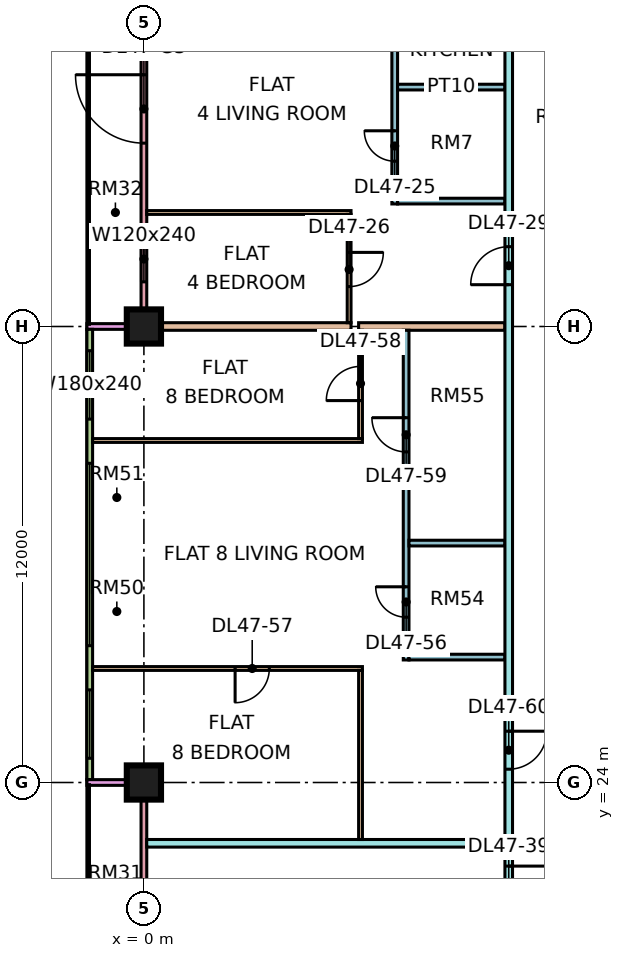
"""IFC4 building model, lengths in metres.
Left out: names, types, materials, properties, quantities, classifications, styles, units other than length and angle.
Written with IfcOpenShell. Run it as: python <this file> out.ifc"""

import sys

from ifc_helpers import new_model, si_unit, direction, frame, frame_2d, origin, origin_2d, place, context, subcontext, project, spatial, rectangle, extrude, element, fill, save


model = new_model("IFC4")
c1 = context("Model", 3, precision=1e-05, world=origin(), true_north=direction((0.0, 1.0)))
c2 = subcontext(c1, "Body", "Model", "MODEL_VIEW")
j1 = project(units=[si_unit("LENGTHUNIT", "METRE"), si_unit("PLANEANGLEUNIT", "RADIAN")], contexts=[c1])
p1 = place(None, origin())
s1 = spatial("IfcSite", under=j1, at=p1, CompositionType="ELEMENT")
p2 = place(p1, origin())
s2 = spatial("IfcBuilding", under=s1, at=p2, CompositionType="ELEMENT")
p3 = place(p2, frame((0.0, 0.0, 202.4)))
s3 = spatial("IfcBuildingStorey", under=s2, at=p3, CompositionType="ELEMENT", Elevation=202.4)
p4 = place(p3, frame((0.0, 24.0, 0.0), z_axis=(0.0, 0.0, 1.0), x_axis=(1.0, 0.0, 0.0)))
e1 = element("IfcColumn", 1, at=p4, inside=s3, PredefinedType="COLUMN", context=c2, shape_type="SweptSolid", body=[
    extrude(rectangle(XDim=0.9, YDim=0.9, at=origin_2d()), origin(), (0.0, 0.0, 1.0), 3.75),
])
p5 = place(p3, frame((0.0, 36.0, 0.0), z_axis=(0.0, 0.0, 1.0), x_axis=(1.0, 0.0, 0.0)))
e2 = element("IfcColumn", 2, at=p5, inside=s3, PredefinedType="COLUMN", context=c2, shape_type="SweptSolid", body=[
    extrude(rectangle(XDim=0.9, YDim=0.9, at=origin_2d()), origin(), (0.0, 0.0, 1.0), 3.75),
])
p6 = place(p3, frame((0.0, 47.925, 0.0), z_axis=(0.0, 0.0, 1.0), x_axis=(0.0, -1.0, 0.0)))
e3 = element("IfcWall", 3, at=p6, inside=s3, PredefinedType="SOLIDWALL", context=c2, shape_type="SweptSolid", body=[
    extrude(rectangle(XDim=11.85, YDim=0.15, at=frame_2d((5.925, 0.0))), origin(), (0.0, 0.0, 1.0), 3.3),
])
p7 = place(p6, frame((0.587, 0.0, 0.45)))
e4 = element("IfcOpeningElement", 4, at=p7, cuts=e3, PredefinedType="OPENING", context=c2, shape_type="SweptSolid", body=[
    extrude(rectangle(XDim=1.2, YDim=2.4, at=frame_2d((0.6, 1.2))), frame((0.0, 0.085, 0.0), z_axis=(0.0, -1.0, 0.0), x_axis=(1.0, 0.0, 0.0)), (0.0, 0.0, 1.0), 0.17),
])
p8 = place(p6, frame((5.3, 0.0, 0.0)))
e5 = element("IfcOpeningElement", 5, at=p8, cuts=e3, PredefinedType="OPENING", context=c2, shape_type="SweptSolid", body=[
    extrude(rectangle(XDim=1.8, YDim=2.4, at=frame_2d((0.9, 1.2))), frame((0.0, 0.085, 0.0), z_axis=(0.0, -1.0, 0.0), x_axis=(1.0, 0.0, 0.0)), (0.0, 0.0, 1.0), 0.17),
])
p9 = place(p6, frame((9.55, 0.0, 0.45)))
e6 = element("IfcOpeningElement", 6, at=p9, cuts=e3, PredefinedType="OPENING", context=c2, shape_type="SweptSolid", body=[
    extrude(rectangle(XDim=1.2, YDim=2.4, at=frame_2d((0.6, 1.2))), frame((0.0, 0.085, 0.0), z_axis=(0.0, -1.0, 0.0), x_axis=(1.0, 0.0, 0.0)), (0.0, 0.0, 1.0), 0.17),
])
p10 = place(p3, frame((-1.5, 36.0, 0.0), z_axis=(0.0, 0.0, 1.0), x_axis=(1.0, 0.0, 0.0)))
e7 = element("IfcWall", 7, at=p10, inside=s3, PredefinedType="SOLIDWALL", context=c2, shape_type="SweptSolid", body=[
    extrude(rectangle(XDim=1.5, YDim=0.15, at=frame_2d((0.75, 0.0))), origin(), (0.0, 0.0, 1.0), 3.3),
])
p11 = place(p3, frame((-1.425, 35.925, 0.0), z_axis=(0.0, 0.0, 1.0), x_axis=(0.0, -1.0, 0.0)))
e8 = element("IfcWall", 8, at=p11, inside=s3, PredefinedType="SOLIDWALL", context=c2, shape_type="SweptSolid", body=[
    extrude(rectangle(XDim=11.85, YDim=0.15, at=frame_2d((5.925, 0.0))), origin(), (0.0, 0.0, 1.0), 3.3),
])
p12 = place(p11, frame((0.562, 0.0, 0.45)))
e9 = element("IfcOpeningElement", 9, at=p12, cuts=e8, PredefinedType="OPENING", context=c2, shape_type="SweptSolid", body=[
    extrude(rectangle(XDim=1.8, YDim=2.4, at=frame_2d((0.9, 1.2))), frame((0.0, 0.085, 0.0), z_axis=(0.0, -1.0, 0.0), x_axis=(1.0, 0.0, 0.0)), (0.0, 0.0, 1.0), 0.17),
])
p13 = place(p11, frame((3.525, 0.0, 0.45)))
e10 = element("IfcOpeningElement", 10, at=p13, cuts=e8, PredefinedType="OPENING", context=c2, shape_type="SweptSolid", body=[
    extrude(rectangle(XDim=4.8, YDim=2.4, at=frame_2d((2.4, 1.2))), frame((0.0, 0.085, 0.0), z_axis=(0.0, -1.0, 0.0), x_axis=(1.0, 0.0, 0.0)), (0.0, 0.0, 1.0), 0.17),
])
p14 = place(p11, frame((9.488, 0.0, 0.45)))
e11 = element("IfcOpeningElement", 11, at=p14, cuts=e8, PredefinedType="OPENING", context=c2, shape_type="SweptSolid", body=[
    extrude(rectangle(XDim=1.8, YDim=2.4, at=frame_2d((0.9, 1.2))), frame((0.0, 0.085, 0.0), z_axis=(0.0, -1.0, 0.0), x_axis=(1.0, 0.0, 0.0)), (0.0, 0.0, 1.0), 0.17),
])
p15 = place(p3, frame((0.0, 23.925, 0.0), z_axis=(0.0, 0.0, 1.0), x_axis=(0.0, -1.0, 0.0)))
e12 = element("IfcWall", 12, at=p15, inside=s3, PredefinedType="SOLIDWALL", context=c2, shape_type="SweptSolid", body=[
    extrude(rectangle(XDim=11.35, YDim=0.15, at=frame_2d((5.675, 0.0))), origin(), (0.0, 0.0, 1.0), 3.3),
])
p16 = place(p15, frame((6.738, 0.0, 0.0)))
e13 = element("IfcOpeningElement", 13, at=p16, cuts=e12, PredefinedType="OPENING", context=c2, shape_type="SweptSolid", body=[
    extrude(rectangle(XDim=1.8, YDim=2.4, at=frame_2d((0.9, 1.2))), frame((0.0, 0.085, 0.0), z_axis=(0.0, -1.0, 0.0), x_axis=(1.0, 0.0, 0.0)), (0.0, 0.0, 1.0), 0.17),
])
p17 = place(p3, frame((-1.5, 24.0, 0.0), z_axis=(0.0, 0.0, 1.0), x_axis=(1.0, 0.0, 0.0)))
e14 = element("IfcWall", 14, at=p17, inside=s3, PredefinedType="SOLIDWALL", context=c2, shape_type="SweptSolid", body=[
    extrude(rectangle(XDim=1.5, YDim=0.15, at=frame_2d((0.75, 0.0))), origin(), (0.0, 0.0, 1.0), 3.3),
])
p18 = place(p3, frame((-1.35, 27.0, 0.0), z_axis=(0.0, 0.0, 1.0), x_axis=(1.0, 0.0, 0.0)))
e15 = element("IfcWall", 15, at=p18, inside=s3, PredefinedType="PARTITIONING", context=c2, shape_type="SweptSolid", body=[
    extrude(rectangle(XDim=7.1, YDim=0.1, at=frame_2d((3.55, 0.0))), origin(), (0.0, 0.0, 1.0), 3.3),
])
p19 = place(p18, frame((3.75, 0.0, 0.0)))
e16 = element("IfcOpeningElement", 16, at=p19, cuts=e15, PredefinedType="OPENING", context=c2, shape_type="SweptSolid", body=[
    extrude(rectangle(XDim=0.9, YDim=2.1, at=frame_2d((0.45, 1.05))), frame((0.0, 0.06, 0.0), z_axis=(0.0, -1.0, 0.0), x_axis=(1.0, 0.0, 0.0)), (0.0, 0.0, 1.0), 0.12),
])
p20 = place(p3, frame((-1.35, 33.0, 0.0), z_axis=(0.0, 0.0, 1.0), x_axis=(1.0, 0.0, 0.0)))
e17 = element("IfcWall", 17, at=p20, inside=s3, PredefinedType="PARTITIONING", context=c2, shape_type="SweptSolid", body=[
    extrude(rectangle(XDim=7.1, YDim=0.1, at=frame_2d((3.55, 0.0))), origin(), (0.0, 0.0, 1.0), 3.3),
])
e18 = element("IfcWall", 18, at=p5, inside=s3, PredefinedType="PARTITIONING", context=c2, shape_type="SweptSolid", body=[
    extrude(rectangle(XDim=5.45, YDim=0.2, at=frame_2d((2.725, 0.0))), origin(), (0.0, 0.0, 1.0), 3.3),
])
p21 = place(p3, frame((0.074, 22.4, 0.0), z_axis=(0.0, 0.0, 1.0), x_axis=(1.0, 0.0, 0.0)))
e19 = element("IfcWall", 19, at=p21, inside=s3, PredefinedType="PARTITIONING", context=c2, shape_type="SweptSolid", body=[
    extrude(rectangle(XDim=9.426, YDim=0.2, at=frame_2d((4.713, 0.0))), origin(), (0.0, 0.0, 1.0), 3.3),
])
p22 = place(p3, frame((0.074, 39.0, 0.0), z_axis=(0.0, 0.0, 1.0), x_axis=(1.0, 0.0, 0.0)))
e20 = element("IfcWall", 20, at=p22, inside=s3, PredefinedType="PARTITIONING", context=c2, shape_type="SweptSolid", body=[
    extrude(rectangle(XDim=5.376, YDim=0.1, at=frame_2d((2.688, 0.0))), origin(), (0.0, 0.0, 1.0), 3.3),
])
p23 = place(p3, frame((5.4, 36.1, 0.0), z_axis=(0.0, 0.0, 1.0), x_axis=(0.0, 1.0, 0.0)))
e21 = element("IfcWall", 21, at=p23, inside=s3, PredefinedType="PARTITIONING", context=c2, shape_type="SweptSolid", body=[
    extrude(rectangle(XDim=2.85, YDim=0.1, at=frame_2d((1.425, 0.0))), origin(), (0.0, 0.0, 1.0), 3.3),
])
p24 = place(p23, frame((0.95, 0.0, 0.0)))
e22 = element("IfcOpeningElement", 22, at=p24, cuts=e21, PredefinedType="OPENING", context=c2, shape_type="SweptSolid", body=[
    extrude(rectangle(XDim=0.9, YDim=2.1, at=frame_2d((0.45, 1.05))), frame((0.0, 0.06, 0.0), z_axis=(0.0, -1.0, 0.0), x_axis=(1.0, 0.0, 0.0)), (0.0, 0.0, 1.0), 0.12),
])
p25 = place(p3, frame((5.65, 36.0, 0.0), z_axis=(0.0, 0.0, 1.0), x_axis=(1.0, 0.0, 0.0)))
e23 = element("IfcWall", 23, at=p25, inside=s3, PredefinedType="PARTITIONING", context=c2, shape_type="SweptSolid", body=[
    extrude(rectangle(XDim=3.85, YDim=0.2, at=frame_2d((1.925, 0.0))), origin(), (0.0, 0.0, 1.0), 3.3),
])
p26 = place(p3, frame((5.7, 22.5, 0.0), z_axis=(0.0, 0.0, 1.0), x_axis=(0.0, 1.0, 0.0)))
e24 = element("IfcWall", 24, at=p26, inside=s3, PredefinedType="PARTITIONING", context=c2, shape_type="SweptSolid", body=[
    extrude(rectangle(XDim=4.45, YDim=0.1, at=frame_2d((2.225, 0.0))), origin(), (0.0, 0.0, 1.0), 3.3),
])
p27 = place(p3, frame((5.7, 33.05, 0.0), z_axis=(0.0, 0.0, 1.0), x_axis=(0.0, 1.0, 0.0)))
e25 = element("IfcWall", 25, at=p27, inside=s3, PredefinedType="PARTITIONING", context=c2, shape_type="SweptSolid", body=[
    extrude(rectangle(XDim=2.85, YDim=0.1, at=frame_2d((1.425, 0.0))), origin(), (0.0, 0.0, 1.0), 3.3),
])
p28 = place(p27, frame((1.0, 0.0, 0.0)))
e26 = element("IfcOpeningElement", 26, at=p28, cuts=e25, PredefinedType="OPENING", context=c2, shape_type="SweptSolid", body=[
    extrude(rectangle(XDim=0.9, YDim=2.1, at=frame_2d((0.45, 1.05))), frame((0.0, 0.06, 0.0), z_axis=(0.0, -1.0, 0.0), x_axis=(1.0, 0.0, 0.0)), (0.0, 0.0, 1.0), 0.12),
])
p29 = place(p3, frame((6.6, 39.225, 0.0), z_axis=(0.0, 0.0, 1.0), x_axis=(0.0, 1.0, 0.0)))
e27 = element("IfcWall", 27, at=p29, inside=s3, PredefinedType="PARTITIONING", context=c2, shape_type="SweptSolid", body=[
    extrude(rectangle(XDim=8.675, YDim=0.15, at=frame_2d((4.337, 0.0))), origin(), (0.0, 0.0, 1.0), 3.3),
])
p30 = place(p29, frame((1.125, 0.0, 0.0)))
e28 = element("IfcOpeningElement", 28, at=p30, cuts=e27, PredefinedType="OPENING", context=c2, shape_type="SweptSolid", body=[
    extrude(rectangle(XDim=0.8, YDim=2.1, at=frame_2d((0.4, 1.05))), frame((0.0, 0.085, 0.0), z_axis=(0.0, -1.0, 0.0), x_axis=(1.0, 0.0, 0.0)), (0.0, 0.0, 1.0), 0.17),
])
p31 = place(p29, frame((5.475, 0.0, 0.0)))
e29 = element("IfcOpeningElement", 29, at=p31, cuts=e27, PredefinedType="OPENING", context=c2, shape_type="SweptSolid", body=[
    extrude(rectangle(XDim=0.9, YDim=2.1, at=frame_2d((0.45, 1.05))), frame((0.0, 0.085, 0.0), z_axis=(0.0, -1.0, 0.0), x_axis=(1.0, 0.0, 0.0)), (0.0, 0.0, 1.0), 0.17),
])
for number, where, z_axis, x_axis in (
    (30, (6.675, 39.3, 0.0), (0.0, 0.0, 1.0), (1.0, 0.0, 0.0)),
    (31, (6.675, 42.3, 0.0), (0.0, 0.0, 1.0), (1.0, 0.0, 0.0)),
):
    element("IfcWall", number, at=place(p3, frame(where, z_axis=z_axis, x_axis=x_axis)), inside=s3, PredefinedType="PARTITIONING", context=c2, shape_type="SweptSolid", body=[
        extrude(rectangle(XDim=2.825, YDim=0.15, at=frame_2d((1.413, 0.0))), origin(), (0.0, 0.0, 1.0), 3.3),
    ])
p32 = place(p3, frame((6.9, 27.225, 0.0), z_axis=(0.0, 0.0, 1.0), x_axis=(0.0, 1.0, 0.0)))
e32 = element("IfcWall", 32, at=p32, inside=s3, PredefinedType="PARTITIONING", context=c2, shape_type="SweptSolid", body=[
    extrude(rectangle(XDim=8.675, YDim=0.15, at=frame_2d((4.337, 0.0))), origin(), (0.0, 0.0, 1.0), 3.3),
])
p33 = place(p32, frame((1.125, 0.0, 0.0)))
e33 = element("IfcOpeningElement", 33, at=p33, cuts=e32, PredefinedType="OPENING", context=c2, shape_type="SweptSolid", body=[
    extrude(rectangle(XDim=0.8, YDim=2.1, at=frame_2d((0.4, 1.05))), frame((0.0, 0.085, 0.0), z_axis=(0.0, -1.0, 0.0), x_axis=(1.0, 0.0, 0.0)), (0.0, 0.0, 1.0), 0.17),
])
p34 = place(p32, frame((5.475, 0.0, 0.0)))
e34 = element("IfcOpeningElement", 34, at=p34, cuts=e32, PredefinedType="OPENING", context=c2, shape_type="SweptSolid", body=[
    extrude(rectangle(XDim=0.9, YDim=2.1, at=frame_2d((0.45, 1.05))), frame((0.0, 0.085, 0.0), z_axis=(0.0, -1.0, 0.0), x_axis=(1.0, 0.0, 0.0)), (0.0, 0.0, 1.0), 0.17),
])
for number, where, z_axis, x_axis in (
    (35, (6.975, 27.3, 0.0), (0.0, 0.0, 1.0), (1.0, 0.0, 0.0)),
    (36, (6.975, 30.3, 0.0), (0.0, 0.0, 1.0), (1.0, 0.0, 0.0)),
):
    element("IfcWall", number, at=place(p3, frame(where, z_axis=z_axis, x_axis=x_axis)), inside=s3, PredefinedType="PARTITIONING", context=c2, shape_type="SweptSolid", body=[
        extrude(rectangle(XDim=2.525, YDim=0.15, at=frame_2d((1.262, 0.0))), origin(), (0.0, 0.0, 1.0), 3.3),
    ])
p35 = place(p3, frame((9.6, 20.0, 0.0), z_axis=(0.0, 0.0, 1.0), x_axis=(0.0, 1.0, 0.0)))
e37 = element("IfcWall", 37, at=p35, inside=s3, PredefinedType="PARTITIONING", context=c2, shape_type="SweptSolid", body=[
    extrude(rectangle(XDim=44.35, YDim=0.2, at=frame_2d((22.175, 0.0))), origin(), (0.0, 0.0, 1.0), 3.3),
])
p36 = place(p35, frame((17.1, 0.0, 0.0)))
e38 = element("IfcOpeningElement", 38, at=p36, cuts=e37, PredefinedType="OPENING", context=c2, shape_type="SweptSolid", body=[
    extrude(rectangle(XDim=1.0, YDim=2.1, at=frame_2d((0.5, 1.05))), frame((0.0, 0.11, 0.0), z_axis=(0.0, -1.0, 0.0), x_axis=(1.0, 0.0, 0.0)), (0.0, 0.0, 1.0), 0.22),
])
p37 = place(p35, frame((29.1, 0.0, 0.0)))
e39 = element("IfcOpeningElement", 39, at=p37, cuts=e37, PredefinedType="OPENING", context=c2, shape_type="SweptSolid", body=[
    extrude(rectangle(XDim=1.0, YDim=2.1, at=frame_2d((0.5, 1.05))), frame((0.0, 0.11, 0.0), z_axis=(0.0, -1.0, 0.0), x_axis=(1.0, 0.0, 0.0)), (0.0, 0.0, 1.0), 0.22),
])
p38 = place(p35, frame((0.6, 0.0, 0.0)))
e40 = element("IfcOpeningElement", 40, at=p38, cuts=e37, PredefinedType="OPENING", context=c2, shape_type="SweptSolid", body=[
    extrude(rectangle(XDim=1.2, YDim=2.1, at=frame_2d((0.6, 1.05))), frame((0.0, 0.11, 0.0), z_axis=(0.0, -1.0, 0.0), x_axis=(1.0, 0.0, 0.0)), (0.0, 0.0, 1.0), 0.22),
])
p39 = place(p35, frame((4.35, 0.0, 0.0)))
e41 = element("IfcOpeningElement", 41, at=p39, cuts=e37, PredefinedType="OPENING", context=c2, shape_type="SweptSolid", body=[
    extrude(rectangle(XDim=1.0, YDim=2.1, at=frame_2d((0.5, 1.05))), frame((0.0, 0.11, 0.0), z_axis=(0.0, -1.0, 0.0), x_axis=(1.0, 0.0, 0.0)), (0.0, 0.0, 1.0), 0.22),
])
p40 = place(p8, frame((1.8, 0.0, 0.0), z_axis=(0.0, 0.0, 1.0), x_axis=(-1.0, 0.0, 0.0)))
e42 = element("IfcDoor", 42, at=p40, inside=s3, OperationType="DOUBLE_DOOR_SINGLE_SWING", PredefinedType="DOOR", context=c2, shape_type="SweptSolid", body=[
    extrude(rectangle(XDim=1.8, YDim=2.4, at=frame_2d((0.9, 1.2))), frame((0.0, 0.025, 0.0), z_axis=(0.0, -1.0, 0.0), x_axis=(1.0, 0.0, 0.0)), (0.0, 0.0, 1.0), 0.05),
])
fill(e5, e42)
p41 = place(p9, origin())
e43 = element("IfcWindow", 43, at=p41, inside=s3, PartitioningType="SINGLE_PANEL", PredefinedType="WINDOW", context=c2, shape_type="SweptSolid", body=[
    extrude(rectangle(XDim=1.2, YDim=2.4, at=frame_2d((0.6, 1.2))), frame((0.0, 0.03, 0.0), z_axis=(0.0, -1.0, 0.0), x_axis=(1.0, 0.0, 0.0)), (0.0, 0.0, 1.0), 0.06),
])
fill(e6, e43)
p42 = place(p12, origin())
e44 = element("IfcWindow", 44, at=p42, inside=s3, PartitioningType="SINGLE_PANEL", PredefinedType="WINDOW", context=c2, shape_type="SweptSolid", body=[
    extrude(rectangle(XDim=1.8, YDim=2.4, at=frame_2d((0.9, 1.2))), frame((0.0, 0.03, 0.0), z_axis=(0.0, -1.0, 0.0), x_axis=(1.0, 0.0, 0.0)), (0.0, 0.0, 1.0), 0.06),
])
fill(e9, e44)
p43 = place(p13, origin())
e45 = element("IfcWindow", 45, at=p43, inside=s3, PartitioningType="SINGLE_PANEL", PredefinedType="WINDOW", context=c2, shape_type="SweptSolid", body=[
    extrude(rectangle(XDim=4.8, YDim=2.4, at=frame_2d((2.4, 1.2))), frame((0.0, 0.03, 0.0), z_axis=(0.0, -1.0, 0.0), x_axis=(1.0, 0.0, 0.0)), (0.0, 0.0, 1.0), 0.06),
])
fill(e10, e45)
p44 = place(p14, origin())
e46 = element("IfcWindow", 46, at=p44, inside=s3, PartitioningType="SINGLE_PANEL", PredefinedType="WINDOW", context=c2, shape_type="SweptSolid", body=[
    extrude(rectangle(XDim=1.8, YDim=2.4, at=frame_2d((0.9, 1.2))), frame((0.0, 0.03, 0.0), z_axis=(0.0, -1.0, 0.0), x_axis=(1.0, 0.0, 0.0)), (0.0, 0.0, 1.0), 0.06),
])
fill(e11, e46)
p45 = place(p30, frame((0.8, 0.0, 0.0), z_axis=(0.0, 0.0, 1.0), x_axis=(-1.0, 0.0, 0.0)))
e47 = element("IfcDoor", 47, at=p45, inside=s3, OperationType="SINGLE_SWING_RIGHT", PredefinedType="DOOR", context=c2, shape_type="SweptSolid", body=[
    extrude(rectangle(XDim=0.8, YDim=2.1, at=frame_2d((0.4, 1.05))), frame((0.0, 0.025, 0.0), z_axis=(0.0, -1.0, 0.0), x_axis=(1.0, 0.0, 0.0)), (0.0, 0.0, 1.0), 0.05),
])
fill(e28, e47)
p46 = place(p24, origin())
e48 = element("IfcDoor", 48, at=p46, inside=s3, OperationType="SINGLE_SWING_RIGHT", PredefinedType="DOOR", context=c2, shape_type="SweptSolid", body=[
    extrude(rectangle(XDim=0.9, YDim=2.1, at=frame_2d((0.45, 1.05))), frame((0.0, 0.025, 0.0), z_axis=(0.0, -1.0, 0.0), x_axis=(1.0, 0.0, 0.0)), (0.0, 0.0, 1.0), 0.05),
])
fill(e22, e48)
p47 = place(p36, origin())
e49 = element("IfcDoor", 49, at=p47, inside=s3, OperationType="SINGLE_SWING_LEFT", PredefinedType="DOOR", context=c2, shape_type="SweptSolid", body=[
    extrude(rectangle(XDim=1.0, YDim=2.1, at=frame_2d((0.5, 1.05))), frame((0.0, 0.025, 0.0), z_axis=(0.0, -1.0, 0.0), x_axis=(1.0, 0.0, 0.0)), (0.0, 0.0, 1.0), 0.05),
])
fill(e38, e49)
p48 = place(p38, origin())
e50 = element("IfcDoor", 50, at=p48, inside=s3, OperationType="SINGLE_SWING_RIGHT", PredefinedType="DOOR", context=c2, shape_type="SweptSolid", body=[
    extrude(rectangle(XDim=1.2, YDim=2.1, at=frame_2d((0.6, 1.05))), frame((0.0, 0.025, 0.0), z_axis=(0.0, -1.0, 0.0), x_axis=(1.0, 0.0, 0.0)), (0.0, 0.0, 1.0), 0.05),
])
fill(e40, e50)
p49 = place(p33, frame((0.8, 0.0, 0.0), z_axis=(0.0, 0.0, 1.0), x_axis=(-1.0, 0.0, 0.0)))
e51 = element("IfcDoor", 51, at=p49, inside=s3, OperationType="SINGLE_SWING_RIGHT", PredefinedType="DOOR", context=c2, shape_type="SweptSolid", body=[
    extrude(rectangle(XDim=0.8, YDim=2.1, at=frame_2d((0.4, 1.05))), frame((0.0, 0.025, 0.0), z_axis=(0.0, -1.0, 0.0), x_axis=(1.0, 0.0, 0.0)), (0.0, 0.0, 1.0), 0.05),
])
fill(e33, e51)
p50 = place(p19, frame((0.9, 0.0, 0.0), z_axis=(0.0, 0.0, 1.0), x_axis=(-1.0, 0.0, 0.0)))
e52 = element("IfcDoor", 52, at=p50, inside=s3, OperationType="SINGLE_SWING_LEFT", PredefinedType="DOOR", context=c2, shape_type="SweptSolid", body=[
    extrude(rectangle(XDim=0.9, YDim=2.1, at=frame_2d((0.45, 1.05))), frame((0.0, 0.025, 0.0), z_axis=(0.0, -1.0, 0.0), x_axis=(1.0, 0.0, 0.0)), (0.0, 0.0, 1.0), 0.05),
])
fill(e16, e52)
p51 = place(p28, origin())
e53 = element("IfcDoor", 53, at=p51, inside=s3, OperationType="SINGLE_SWING_LEFT", PredefinedType="DOOR", context=c2, shape_type="SweptSolid", body=[
    extrude(rectangle(XDim=0.9, YDim=2.1, at=frame_2d((0.45, 1.05))), frame((0.0, 0.025, 0.0), z_axis=(0.0, -1.0, 0.0), x_axis=(1.0, 0.0, 0.0)), (0.0, 0.0, 1.0), 0.05),
])
fill(e26, e53)
p52 = place(p34, frame((0.9, 0.0, 0.0), z_axis=(0.0, 0.0, 1.0), x_axis=(-1.0, 0.0, 0.0)))
e54 = element("IfcDoor", 54, at=p52, inside=s3, OperationType="SINGLE_SWING_RIGHT", PredefinedType="DOOR", context=c2, shape_type="SweptSolid", body=[
    extrude(rectangle(XDim=0.9, YDim=2.1, at=frame_2d((0.45, 1.05))), frame((0.0, 0.025, 0.0), z_axis=(0.0, -1.0, 0.0), x_axis=(1.0, 0.0, 0.0)), (0.0, 0.0, 1.0), 0.05),
])
fill(e34, e54)
p53 = place(p39, origin())
e55 = element("IfcDoor", 55, at=p53, inside=s3, OperationType="SINGLE_SWING_RIGHT", PredefinedType="DOOR", context=c2, shape_type="SweptSolid", body=[
    extrude(rectangle(XDim=1.0, YDim=2.1, at=frame_2d((0.5, 1.05))), frame((0.0, 0.025, 0.0), z_axis=(0.0, -1.0, 0.0), x_axis=(1.0, 0.0, 0.0)), (0.0, 0.0, 1.0), 0.05),
])
fill(e41, e55)
save(model, sys.argv[1])
